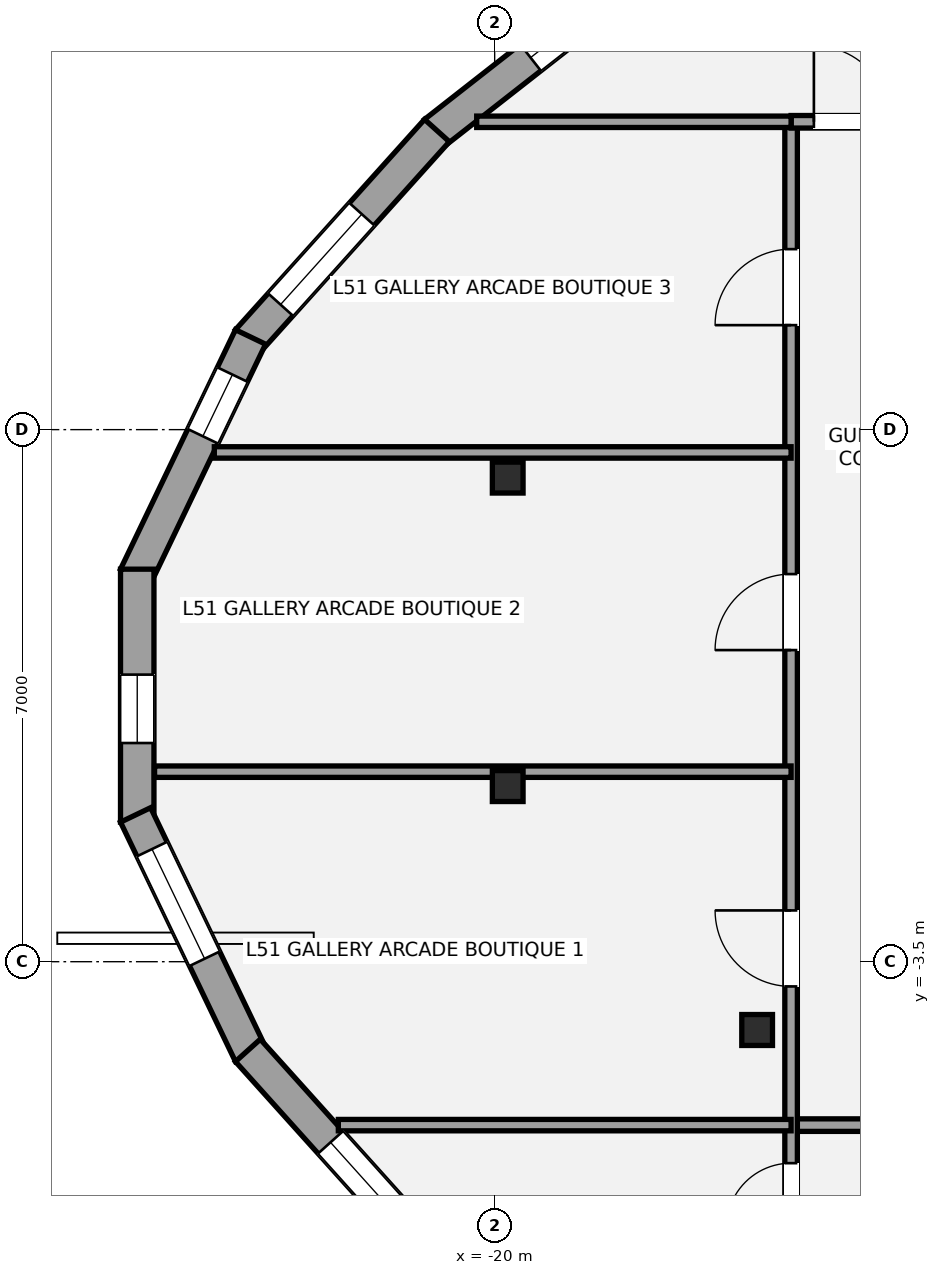
"""IFC4 building model, lengths in metres.
Left out: names, types, materials, properties, quantities, classifications, styles, units other than length and angle.
Written with IfcOpenShell. Run it as: python <this file> out.ifc"""

import sys

from ifc_helpers import new_model, si_unit, direction, frame, frame_2d, origin, origin_2d, place, context, subcontext, project, spatial, rectangle, i_section, extrude, element, fill, save


model = new_model("IFC4")
c1 = context("Model", 3, precision=1e-05, world=origin(), true_north=direction((0.0, 1.0)))
c2 = subcontext(c1, "Body", "Model", "MODEL_VIEW")
j1 = project(units=[si_unit("LENGTHUNIT", "METRE"), si_unit("PLANEANGLEUNIT", "RADIAN")], contexts=[c1])
p1 = place(None, origin())
s1 = spatial("IfcSite", under=j1, at=p1, CompositionType="ELEMENT")
p2 = place(p1, origin())
s2 = spatial("IfcBuilding", under=s1, at=p2, CompositionType="ELEMENT")
p3 = place(p2, frame((0.0, 0.0, 185.4)))
s3 = spatial("IfcBuildingStorey", under=s2, at=p3, CompositionType="ELEMENT", Elevation=185.4)
for number, where, z_axis, x_axis in (
    (1, (-19.828, 2.869, 0.0), (0.0, 0.0, 1.0), (1.0, 0.0, 0.0)),
    (2, (-19.828, -1.189, 0.0), (0.0, 0.0, 1.0), (1.0, 0.0, 0.0)),
    (3, (-16.547, -4.398, 0.0), (0.0, 0.0, 1.0), (1.0, 0.0, 0.0)),
):
    element("IfcColumn", number, at=place(p3, frame(where, z_axis=z_axis, x_axis=x_axis)), inside=s3, PredefinedType="COLUMN", context=c2, shape_type="SweptSolid", body=[
        extrude(i_section(OverallWidth=0.404, OverallDepth=0.407, WebThickness=0.027, FlangeThickness=0.044, at=origin_2d()), origin(), (0.0, 0.0, 1.0), 3.2),
    ])
p4 = place(p3, frame((-20.787, 7.408, 0.0), z_axis=(0.0, 0.0, 1.0), x_axis=(0.787518383176, 0.616291161838, 0.0)))
e4 = element("IfcWall", 4, at=p4, inside=s3, PredefinedType="STANDARD", context=c2, shape_type="SweptSolid", body=[
    extrude(rectangle(XDim=3.85, YDim=0.44, at=frame_2d((1.925, 0.0))), origin(), (0.0, 0.0, 1.0), 2.315),
])
p5 = place(p4, frame((1.6, 0.0, 0.58)))
e5 = element("IfcOpeningElement", 5, at=p5, cuts=e4, PredefinedType="OPENING", context=c2, shape_type="SweptSolid", body=[
    extrude(rectangle(XDim=1.6, YDim=1.55, at=frame_2d((0.8, 0.775))), frame((0.0, 0.23, 0.0), z_axis=(0.0, -1.0, 0.0), x_axis=(1.0, 0.0, 0.0)), (0.0, 0.0, 1.0), 0.46),
])
p6 = place(p3, frame((-23.247, 4.667, 0.0), z_axis=(0.0, 0.0, 1.0), x_axis=(0.668547778607, 0.743669192396, 0.0)))
e6 = element("IfcWall", 6, at=p6, inside=s3, PredefinedType="STANDARD", context=c2, shape_type="SweptSolid", body=[
    extrude(rectangle(XDim=3.721, YDim=0.44, at=frame_2d((1.861, 0.0))), origin(), (0.0, 0.0, 1.0), 2.315),
])
p7 = place(p6, frame((0.643, 0.0, 0.58)))
e7 = element("IfcOpeningElement", 7, at=p7, cuts=e6, PredefinedType="OPENING", context=c2, shape_type="SweptSolid", body=[
    extrude(rectangle(XDim=1.6, YDim=1.55, at=frame_2d((0.8, 0.775))), frame((0.0, 0.23, 0.0), z_axis=(0.0, -1.0, 0.0), x_axis=(1.0, 0.0, 0.0)), (0.0, 0.0, 1.0), 0.46),
])
p8 = place(p3, frame((-24.725, 1.569, 0.0), z_axis=(0.0, 0.0, 1.0), x_axis=(0.43276286683, 0.90150779314, 0.0)))
e8 = element("IfcWall", 8, at=p8, inside=s3, PredefinedType="STANDARD", context=c2, shape_type="SweptSolid", body=[
    extrude(rectangle(XDim=3.494, YDim=0.44, at=frame_2d((1.747, 0.0))), origin(), (0.0, 0.0, 1.0), 2.315),
])
p9 = place(p8, frame((2.045, 0.0, 0.58)))
e9 = element("IfcOpeningElement", 9, at=p9, cuts=e8, PredefinedType="OPENING", context=c2, shape_type="SweptSolid", body=[
    extrude(rectangle(XDim=0.9, YDim=1.35, at=frame_2d((0.45, 0.675))), frame((0.0, 0.23, 0.0), z_axis=(0.0, -1.0, 0.0), x_axis=(1.0, 0.0, 0.0)), (0.0, 0.0, 1.0), 0.46),
])
p10 = place(p3, frame((-24.703, -1.664, 0.0), z_axis=(0.0, 0.0, 1.0), x_axis=(0.0, 1.0, 0.0)))
e10 = element("IfcWall", 10, at=p10, inside=s3, PredefinedType="STANDARD", context=c2, shape_type="SweptSolid", body=[
    extrude(rectangle(XDim=3.328, YDim=0.44, at=frame_2d((1.664, 0.0))), origin(), (0.0, 0.0, 1.0), 2.315),
])
p11 = place(p10, frame((1.041, 0.0, 0.58)))
e11 = element("IfcOpeningElement", 11, at=p11, cuts=e10, PredefinedType="OPENING", context=c2, shape_type="SweptSolid", body=[
    extrude(rectangle(XDim=0.9, YDim=1.35, at=frame_2d((0.45, 0.675))), frame((0.0, 0.23, 0.0), z_axis=(0.0, -1.0, 0.0), x_axis=(1.0, 0.0, 0.0)), (0.0, 0.0, 1.0), 0.46),
])
p12 = place(p3, frame((-23.212, -4.719, 0.0), z_axis=(0.0, 0.0, 1.0), x_axis=(-0.43276286683, 0.90150779314, 0.0)))
e12 = element("IfcWall", 12, at=p12, inside=s3, PredefinedType="STANDARD", context=c2, shape_type="SweptSolid", body=[
    extrude(rectangle(XDim=3.494, YDim=0.44, at=frame_2d((1.747, 0.0))), origin(), (0.0, 0.0, 1.0), 2.315),
])
p13 = place(p12, frame((1.396, 0.0, 0.58)))
e13 = element("IfcOpeningElement", 13, at=p13, cuts=e12, PredefinedType="OPENING", context=c2, shape_type="SweptSolid", body=[
    extrude(rectangle(XDim=1.6, YDim=1.55, at=frame_2d((0.8, 0.775))), frame((0.0, 0.23, 0.0), z_axis=(0.0, -1.0, 0.0), x_axis=(1.0, 0.0, 0.0)), (0.0, 0.0, 1.0), 0.46),
])
p14 = place(p3, frame((-20.759, -7.435, 0.0), z_axis=(0.0, 0.0, 1.0), x_axis=(-0.668547778607, 0.743669192396, 0.0)))
e14 = element("IfcWall", 14, at=p14, inside=s3, PredefinedType="STANDARD", context=c2, shape_type="SweptSolid", body=[
    extrude(rectangle(XDim=3.721, YDim=0.44, at=frame_2d((1.861, 0.0))), origin(), (0.0, 0.0, 1.0), 2.315),
])
p15 = place(p14, frame((0.495, 0.0, 0.58)))
e15 = element("IfcOpeningElement", 15, at=p15, cuts=e14, PredefinedType="OPENING", context=c2, shape_type="SweptSolid", body=[
    extrude(rectangle(XDim=1.6, YDim=1.55, at=frame_2d((0.8, 0.775))), frame((0.0, 0.23, 0.0), z_axis=(0.0, -1.0, 0.0), x_axis=(1.0, 0.0, 0.0)), (0.0, 0.0, 1.0), 0.46),
])
p16 = place(p3, frame((-16.1, -5.65, 0.0), z_axis=(0.0, 0.0, 1.0), x_axis=(1.0, 0.0, 0.0)))
e16 = element("IfcWall", 16, at=p16, inside=s3, PredefinedType="PARTITIONING", context=c2, shape_type="SweptSolid", body=[
    extrude(rectangle(XDim=31.65, YDim=0.165, at=frame_2d((15.825, 0.0))), origin(), (0.0, 0.0, 1.0), 2.398),
])
p17 = place(p16, frame((8.95, 0.0, 0.0)))
e17 = element("IfcOpeningElement", 17, at=p17, cuts=e16, PredefinedType="OPENING", context=c2, shape_type="SweptSolid", body=[
    extrude(rectangle(XDim=0.95, YDim=2.15, at=frame_2d((0.475, 1.075))), frame((0.0, 0.093, 0.0), z_axis=(0.0, -1.0, 0.0), x_axis=(1.0, 0.0, 0.0)), (0.0, 0.0, 1.0), 0.185),
])
p18 = place(p16, frame((18.95, 0.0, 0.0)))
e18 = element("IfcOpeningElement", 18, at=p18, cuts=e16, PredefinedType="OPENING", context=c2, shape_type="SweptSolid", body=[
    extrude(rectangle(XDim=0.95, YDim=2.15, at=frame_2d((0.475, 1.075))), frame((0.0, 0.093, 0.0), z_axis=(0.0, -1.0, 0.0), x_axis=(1.0, 0.0, 0.0)), (0.0, 0.0, 1.0), 0.185),
])
p19 = place(p16, frame((30.3, 0.0, 0.0)))
e19 = element("IfcOpeningElement", 19, at=p19, cuts=e16, PredefinedType="OPENING", context=c2, shape_type="SweptSolid", body=[
    extrude(rectangle(XDim=0.95, YDim=2.15, at=frame_2d((0.475, 1.075))), frame((0.0, 0.093, 0.0), z_axis=(0.0, -1.0, 0.0), x_axis=(1.0, 0.0, 0.0)), (0.0, 0.0, 1.0), 0.185),
])
p20 = place(p3, frame((-16.1, -10.627, 0.0), z_axis=(0.0, 0.0, 1.0), x_axis=(0.0, 1.0, 0.0)))
e20 = element("IfcWall", 20, at=p20, inside=s3, PredefinedType="PARTITIONING", context=c2, shape_type="SweptSolid", body=[
    extrude(rectangle(XDim=18.177, YDim=0.165, at=frame_2d((9.088, 0.0))), origin(), (0.0, 0.0, 1.0), 2.473),
])
p21 = place(p20, frame((3.627, 0.0, 0.0)))
e21 = element("IfcOpeningElement", 21, at=p21, cuts=e20, PredefinedType="OPENING", context=c2, shape_type="SweptSolid", body=[
    extrude(rectangle(XDim=0.85, YDim=2.1, at=frame_2d((0.425, 1.05))), frame((0.0, 0.093, 0.0), z_axis=(0.0, -1.0, 0.0), x_axis=(1.0, 0.0, 0.0)), (0.0, 0.0, 1.0), 0.185),
])
p22 = place(p20, frame((6.802, 0.0, 0.0)))
e22 = element("IfcOpeningElement", 22, at=p22, cuts=e20, PredefinedType="OPENING", context=c2, shape_type="SweptSolid", body=[
    extrude(rectangle(XDim=1.0, YDim=2.15, at=frame_2d((0.5, 1.075))), frame((0.0, 0.093, 0.0), z_axis=(0.0, -1.0, 0.0), x_axis=(1.0, 0.0, 0.0)), (0.0, 0.0, 1.0), 0.185),
])
p23 = place(p20, frame((11.227, 0.0, 0.0)))
e23 = element("IfcOpeningElement", 23, at=p23, cuts=e20, PredefinedType="OPENING", context=c2, shape_type="SweptSolid", body=[
    extrude(rectangle(XDim=1.0, YDim=2.15, at=frame_2d((0.5, 1.075))), frame((0.0, 0.093, 0.0), z_axis=(0.0, -1.0, 0.0), x_axis=(1.0, 0.0, 0.0)), (0.0, 0.0, 1.0), 0.185),
])
p24 = place(p20, frame((15.502, 0.0, 0.0)))
e24 = element("IfcOpeningElement", 24, at=p24, cuts=e20, PredefinedType="OPENING", context=c2, shape_type="SweptSolid", body=[
    extrude(rectangle(XDim=1.0, YDim=2.15, at=frame_2d((0.5, 1.075))), frame((0.0, 0.093, 0.0), z_axis=(0.0, -1.0, 0.0), x_axis=(1.0, 0.0, 0.0)), (0.0, 0.0, 1.0), 0.185),
])
p25 = place(p3, frame((-16.1, 7.55, 0.0), z_axis=(0.0, 0.0, 1.0), x_axis=(1.0, 0.0, 0.0)))
e25 = element("IfcWall", 25, at=p25, inside=s3, PredefinedType="PARTITIONING", context=c2, shape_type="SweptSolid", body=[
    extrude(rectangle(XDim=2.3, YDim=0.165, at=frame_2d((1.15, 0.0))), origin(), (0.0, 0.0, 1.0), 2.473),
])
p26 = place(p25, frame((0.3, 0.0, 0.0)))
e26 = element("IfcOpeningElement", 26, at=p26, cuts=e25, PredefinedType="OPENING", context=c2, shape_type="SweptSolid", body=[
    extrude(rectangle(XDim=1.0, YDim=2.15, at=frame_2d((0.5, 1.075))), frame((0.0, 0.093, 0.0), z_axis=(0.0, -1.0, 0.0), x_axis=(1.0, 0.0, 0.0)), (0.0, 0.0, 1.0), 0.185),
])
p27 = place(p3, frame((-20.236, 7.55, 0.0), z_axis=(0.0, 0.0, 1.0), x_axis=(1.0, 0.0, 0.0)))
e27 = element("IfcWall", 27, at=p27, inside=s3, PredefinedType="PLUMBINGWALL", context=c2, shape_type="SweptSolid", body=[
    extrude(rectangle(XDim=4.136, YDim=0.15, at=frame_2d((2.068, 0.0))), origin(), (0.0, 0.0, 1.0), 2.473),
])
p28 = place(p3, frame((-22.057, -5.65, 0.0), z_axis=(0.0, 0.0, 1.0), x_axis=(1.0, 0.0, 0.0)))
e28 = element("IfcWall", 28, at=p28, inside=s3, PredefinedType="PLUMBINGWALL", context=c2, shape_type="SweptSolid", body=[
    extrude(rectangle(XDim=5.957, YDim=0.15, at=frame_2d((2.979, 0.0))), origin(), (0.0, 0.0, 1.0), 2.473),
])
p29 = place(p3, frame((-24.475, -1.0, 0.0), z_axis=(0.0, 0.0, 1.0), x_axis=(1.0, 0.0, 0.0)))
e29 = element("IfcWall", 29, at=p29, inside=s3, PredefinedType="PLUMBINGWALL", context=c2, shape_type="SweptSolid", body=[
    extrude(rectangle(XDim=8.375, YDim=0.15, at=frame_2d((4.188, 0.0))), origin(), (0.0, 0.0, 1.0), 2.473),
])
p30 = place(p3, frame((-23.689, 3.2, 0.0), z_axis=(0.0, 0.0, 1.0), x_axis=(1.0, 0.0, 0.0)))
e30 = element("IfcWall", 30, at=p30, inside=s3, PredefinedType="PLUMBINGWALL", context=c2, shape_type="SweptSolid", body=[
    extrude(rectangle(XDim=7.589, YDim=0.15, at=frame_2d((3.794, 0.0))), origin(), (0.0, 0.0, 1.0), 2.473),
])
p31 = place(p5, origin())
e31 = element("IfcWindow", 31, at=p31, inside=s3, PartitioningType="SINGLE_PANEL", PredefinedType="WINDOW", context=c2, shape_type="SweptSolid", body=[
    extrude(rectangle(XDim=1.6, YDim=1.55, at=frame_2d((0.8, 0.775))), frame((0.0, -0.01, 0.0), z_axis=(0.0, -1.0, 0.0), x_axis=(1.0, 0.0, 0.0)), (0.0, 0.0, 1.0), 0.06),
])
fill(e5, e31)
p32 = place(p7, origin())
e32 = element("IfcWindow", 32, at=p32, inside=s3, PartitioningType="SINGLE_PANEL", PredefinedType="WINDOW", context=c2, shape_type="SweptSolid", body=[
    extrude(rectangle(XDim=1.6, YDim=1.55, at=frame_2d((0.8, 0.775))), frame((0.0, -0.01, 0.0), z_axis=(0.0, -1.0, 0.0), x_axis=(1.0, 0.0, 0.0)), (0.0, 0.0, 1.0), 0.06),
])
fill(e7, e32)
p33 = place(p9, origin())
e33 = element("IfcWindow", 33, at=p33, inside=s3, PartitioningType="SINGLE_PANEL", PredefinedType="WINDOW", context=c2, shape_type="SweptSolid", body=[
    extrude(rectangle(XDim=0.9, YDim=1.35, at=frame_2d((0.45, 0.675))), frame((0.0, -0.01, 0.0), z_axis=(0.0, -1.0, 0.0), x_axis=(1.0, 0.0, 0.0)), (0.0, 0.0, 1.0), 0.06),
])
fill(e9, e33)
p34 = place(p11, origin())
e34 = element("IfcWindow", 34, at=p34, inside=s3, PartitioningType="SINGLE_PANEL", PredefinedType="WINDOW", context=c2, shape_type="SweptSolid", body=[
    extrude(rectangle(XDim=0.9, YDim=1.35, at=frame_2d((0.45, 0.675))), frame((0.0, -0.01, 0.0), z_axis=(0.0, -1.0, 0.0), x_axis=(1.0, 0.0, 0.0)), (0.0, 0.0, 1.0), 0.06),
])
fill(e11, e34)
p35 = place(p13, origin())
e35 = element("IfcWindow", 35, at=p35, inside=s3, PartitioningType="SINGLE_PANEL", PredefinedType="WINDOW", context=c2, shape_type="SweptSolid", body=[
    extrude(rectangle(XDim=1.6, YDim=1.55, at=frame_2d((0.8, 0.775))), frame((0.0, -0.01, 0.0), z_axis=(0.0, -1.0, 0.0), x_axis=(1.0, 0.0, 0.0)), (0.0, 0.0, 1.0), 0.06),
])
fill(e13, e35)
p36 = place(p15, origin())
e36 = element("IfcWindow", 36, at=p36, inside=s3, PartitioningType="SINGLE_PANEL", PredefinedType="WINDOW", context=c2, shape_type="SweptSolid", body=[
    extrude(rectangle(XDim=1.6, YDim=1.55, at=frame_2d((0.8, 0.775))), frame((0.0, -0.01, 0.0), z_axis=(0.0, -1.0, 0.0), x_axis=(1.0, 0.0, 0.0)), (0.0, 0.0, 1.0), 0.06),
])
fill(e15, e36)
p37 = place(p26, origin())
e37 = element("IfcDoor", 37, at=p37, inside=s3, OperationType="SINGLE_SWING_LEFT", PredefinedType="DOOR", context=c2, shape_type="SweptSolid", body=[
    extrude(rectangle(XDim=1.0, YDim=2.15, at=frame_2d((0.5, 1.075))), frame((0.0, 0.025, 0.0), z_axis=(0.0, -1.0, 0.0), x_axis=(1.0, 0.0, 0.0)), (0.0, 0.0, 1.0), 0.05),
])
fill(e26, e37)
p38 = place(p21, origin())
e38 = element("IfcDoor", 38, at=p38, inside=s3, OperationType="SINGLE_SWING_LEFT", PredefinedType="DOOR", context=c2, shape_type="SweptSolid", body=[
    extrude(rectangle(XDim=0.85, YDim=2.1, at=frame_2d((0.425, 1.05))), frame((0.0, 0.025, 0.0), z_axis=(0.0, -1.0, 0.0), x_axis=(1.0, 0.0, 0.0)), (0.0, 0.0, 1.0), 0.05),
])
fill(e21, e38)
p39 = place(p22, origin())
e39 = element("IfcDoor", 39, at=p39, inside=s3, OperationType="SINGLE_SWING_RIGHT", PredefinedType="DOOR", context=c2, shape_type="SweptSolid", body=[
    extrude(rectangle(XDim=1.0, YDim=2.15, at=frame_2d((0.5, 1.075))), frame((0.0, 0.025, 0.0), z_axis=(0.0, -1.0, 0.0), x_axis=(1.0, 0.0, 0.0)), (0.0, 0.0, 1.0), 0.05),
])
fill(e22, e39)
p40 = place(p23, origin())
e40 = element("IfcDoor", 40, at=p40, inside=s3, OperationType="SINGLE_SWING_LEFT", PredefinedType="DOOR", context=c2, shape_type="SweptSolid", body=[
    extrude(rectangle(XDim=1.0, YDim=2.15, at=frame_2d((0.5, 1.075))), frame((0.0, 0.025, 0.0), z_axis=(0.0, -1.0, 0.0), x_axis=(1.0, 0.0, 0.0)), (0.0, 0.0, 1.0), 0.05),
])
fill(e23, e40)
p41 = place(p24, origin())
e41 = element("IfcDoor", 41, at=p41, inside=s3, OperationType="SINGLE_SWING_LEFT", PredefinedType="DOOR", context=c2, shape_type="SweptSolid", body=[
    extrude(rectangle(XDim=1.0, YDim=2.15, at=frame_2d((0.5, 1.075))), frame((0.0, 0.025, 0.0), z_axis=(0.0, -1.0, 0.0), x_axis=(1.0, 0.0, 0.0)), (0.0, 0.0, 1.0), 0.05),
])
fill(e24, e41)
save(model, sys.argv[1])
